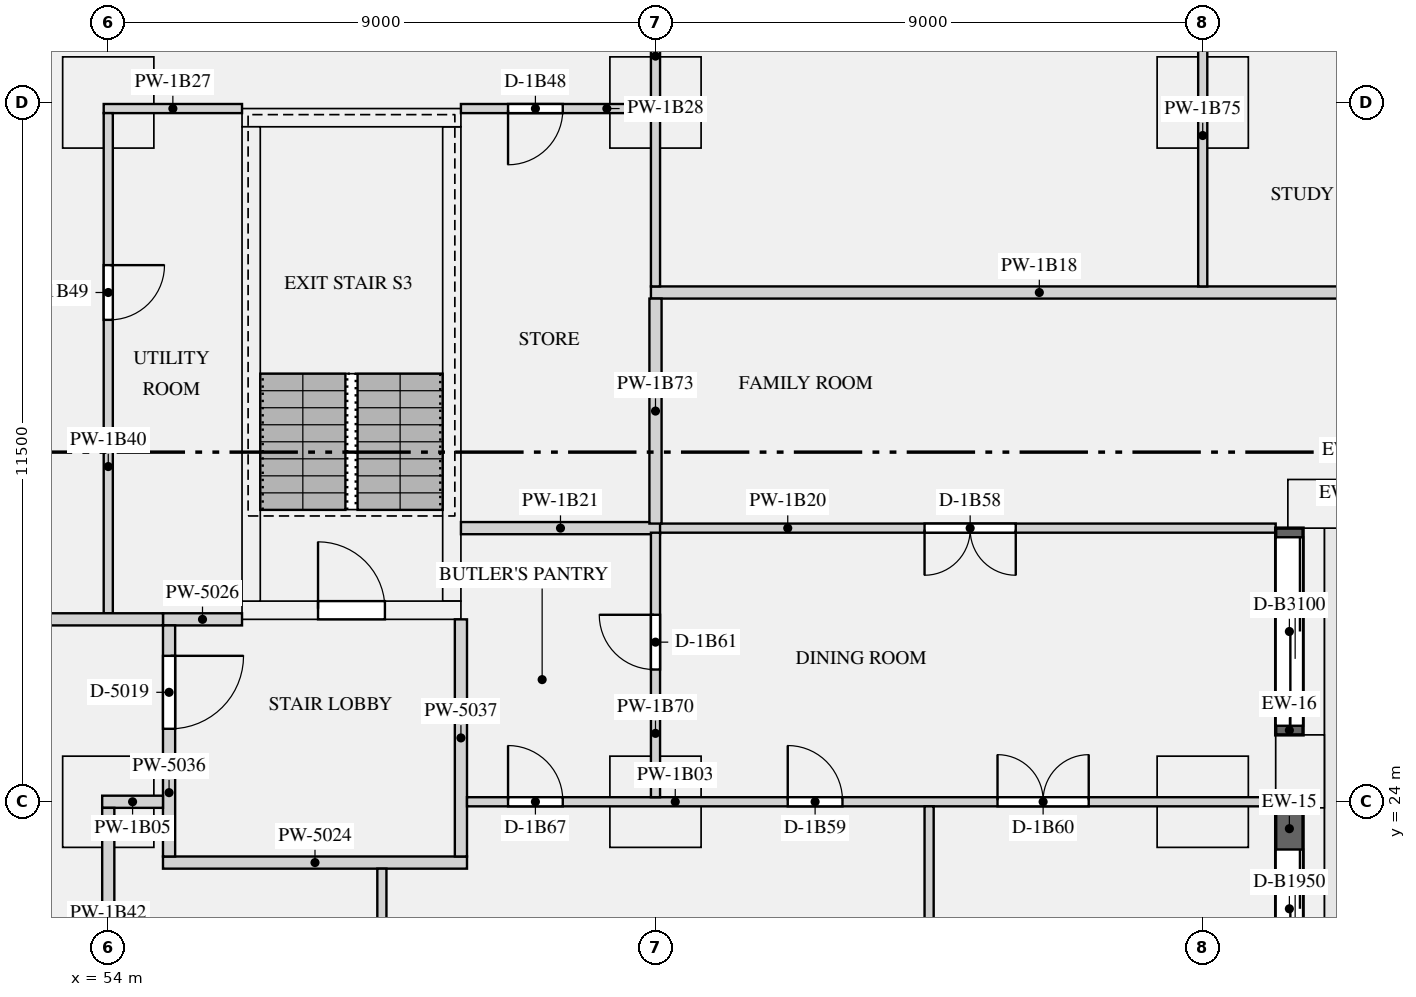
"""IFC4 building model, lengths in metres.
Left out: names, types, materials, properties, quantities, classifications, styles, units other than length and angle.
Written with IfcOpenShell. Run it as: python <this file> out.ifc"""

import sys

from ifc_helpers import new_model, si_unit, direction, frame, frame_2d, origin, origin_2d, place, context, subcontext, project, spatial, rectangle, extrude, element, fill, save


model = new_model("IFC4")
c1 = context("Model", 3, precision=1e-05, world=origin(), true_north=direction((0.0, 1.0)))
c2 = subcontext(c1, "Body", "Model", "MODEL_VIEW")
j1 = project(units=[si_unit("LENGTHUNIT", "METRE"), si_unit("PLANEANGLEUNIT", "RADIAN")], contexts=[c1])
p1 = place(None, origin())
s1 = spatial("IfcSite", under=j1, at=p1, CompositionType="ELEMENT")
p2 = place(p1, origin())
s2 = spatial("IfcBuilding", under=s1, at=p2, CompositionType="ELEMENT")
p3 = place(p2, frame((0.0, 0.0, 28.95)))
s3 = spatial("IfcBuildingStorey", under=s2, at=p3, CompositionType="ELEMENT", Elevation=28.95)
for number, where, z_axis, x_axis in (
    (1, (73.6, 24.5, 0.0), (0.0, 0.0, 1.0), (0.0, 1.0, 0.0)),
    (2, (74.0, 28.9, 0.0), (0.0, 0.0, 1.0), (1.0, 0.0, 0.0)),
):
    element("IfcColumn", number, at=place(p3, frame(where, z_axis=z_axis, x_axis=x_axis)), inside=s3, PredefinedType="USERDEFINED", context=c2, shape_type="SweptSolid", body=[
        extrude(rectangle(XDim=1.2, YDim=0.8, at=origin_2d()), origin(), (0.0, 0.0, 1.0), 3.15),
    ])
for number, where, z_axis, x_axis in (
    (3, (54.0, 24.0, 0.0), (0.0, 0.0, 1.0), (1.0, 0.0, 0.0)),
    (4, (63.0, 24.0, 0.0), (0.0, 0.0, 1.0), (1.0, 0.0, 0.0)),
    (5, (72.0, 24.0, 0.0), (0.0, 0.0, 1.0), (1.0, 0.0, 0.0)),
    (6, (54.0, 35.5, 0.0), (0.0, 0.0, 1.0), (1.0, 0.0, 0.0)),
    (7, (63.0, 35.5, 0.0), (0.0, 0.0, 1.0), (1.0, 0.0, 0.0)),
    (8, (72.0, 35.5, 0.0), (0.0, 0.0, 1.0), (1.0, 0.0, 0.0)),
):
    element("IfcColumn", number, at=place(p3, frame(where, z_axis=z_axis, x_axis=x_axis)), inside=s3, PredefinedType="COLUMN", context=c2, shape_type="SweptSolid", body=[
        extrude(rectangle(XDim=1.5, YDim=1.5, at=origin_2d()), origin(), (0.0, 0.0, 1.0), 3.15),
    ])
p4 = place(p3, frame((56.2, 27.15, 0.0), z_axis=(0.0, 0.0, 1.0), x_axis=(1.0, 0.0, 0.0)))
e9 = element("IfcWall", 9, at=p4, inside=s3, PredefinedType="SHEAR", context=c2, shape_type="SweptSolid", body=[
    extrude(rectangle(XDim=3.6, YDim=0.3, at=frame_2d((1.8, 0.0))), origin(), (0.0, 0.0, 1.0), 3.15),
])
p5 = place(p4, frame((1.25, 0.0, 0.0)))
e10 = element("IfcOpeningElement", 10, at=p5, cuts=e9, PredefinedType="OPENING", context=c2, shape_type="SweptSolid", body=[
    extrude(rectangle(XDim=1.1, YDim=2.1, at=frame_2d((0.55, 1.05))), frame((0.0, 0.16, 0.0), z_axis=(0.0, -1.0, 0.0), x_axis=(1.0, 0.0, 0.0)), (0.0, 0.0, 1.0), 0.32),
])
p6 = place(p3, frame((56.2, 35.25, 0.0), z_axis=(0.0, 0.0, 1.0), x_axis=(1.0, 0.0, 0.0)))
e11 = element("IfcWall", 11, at=p6, inside=s3, PredefinedType="SHEAR", context=c2, shape_type="SweptSolid", body=[
    extrude(rectangle(XDim=3.6, YDim=0.3, at=frame_2d((1.8, 0.0))), origin(), (0.0, 0.0, 1.0), 3.15),
])
for number, where, z_axis, x_axis in (
    (12, (56.35, 27.3, 0.0), (0.0, 0.0, 1.0), (0.0, 1.0, 0.0)),
    (13, (59.65, 27.3, 0.0), (0.0, 0.0, 1.0), (0.0, 1.0, 0.0)),
):
    element("IfcWall", number, at=place(p3, frame(where, z_axis=z_axis, x_axis=x_axis)), inside=s3, PredefinedType="SHEAR", context=c2, shape_type="SweptSolid", body=[
        extrude(rectangle(XDim=7.8, YDim=0.3, at=frame_2d((3.9, 0.0))), origin(), (0.0, 0.0, 1.0), 3.15),
    ])
p7 = place(p3, frame((73.425, 21.1, 0.0), z_axis=(0.0, 0.0, 1.0), x_axis=(0.0, 1.0, 0.0)))
e14 = element("IfcWall", 14, at=p7, inside=s3, PredefinedType="SOLIDWALL", context=c2, shape_type="SweptSolid", body=[
    extrude(rectangle(XDim=2.8, YDim=0.45, at=frame_2d((1.4, 0.0))), origin(), (0.0, 0.0, 1.0), 2.83),
])
p8 = place(p7, frame((0.165, 0.0, 0.0)))
e15 = element("IfcOpeningElement", 15, at=p8, cuts=e14, PredefinedType="OPENING", context=c2, shape_type="SweptSolid", body=[
    extrude(rectangle(XDim=1.95, YDim=2.3, at=frame_2d((0.975, 1.15))), frame((0.0, 0.235, 0.0), z_axis=(0.0, -1.0, 0.0), x_axis=(1.0, 0.0, 0.0)), (0.0, 0.0, 1.0), 0.47),
])
p9 = place(p3, frame((73.425, 25.1, 0.0), z_axis=(0.0, 0.0, 1.0), x_axis=(0.0, 1.0, 0.0)))
e16 = element("IfcWall", 16, at=p9, inside=s3, PredefinedType="SOLIDWALL", context=c2, shape_type="SweptSolid", body=[
    extrude(rectangle(XDim=3.4, YDim=0.45, at=frame_2d((1.7, 0.0))), origin(), (0.0, 0.0, 1.0), 2.83),
])
p10 = place(p9, frame((0.15, 0.0, 0.0)))
e17 = element("IfcOpeningElement", 17, at=p10, cuts=e16, PredefinedType="OPENING", context=c2, shape_type="SweptSolid", body=[
    extrude(rectangle(XDim=3.1, YDim=2.3, at=frame_2d((1.55, 1.15))), frame((0.0, 0.235, 0.0), z_axis=(0.0, -1.0, 0.0), x_axis=(1.0, 0.0, 0.0)), (0.0, 0.0, 1.0), 0.47),
])
p11 = place(p3, frame((54.9, 23.0, 0.0), z_axis=(0.0, 0.0, 1.0), x_axis=(1.0, 0.0, 0.0)))
e18 = element("IfcWall", 18, at=p11, inside=s3, PredefinedType="PARTITIONING", context=c2, shape_type="SweptSolid", body=[
    extrude(rectangle(XDim=5.0, YDim=0.2, at=frame_2d((2.5, 0.0))), origin(), (0.0, 0.0, 1.0), 2.83),
])
p12 = place(p3, frame((54.9, 27.0, 0.0), z_axis=(0.0, 0.0, 1.0), x_axis=(1.0, 0.0, 0.0)))
e19 = element("IfcWall", 19, at=p12, inside=s3, PredefinedType="PARTITIONING", context=c2, shape_type="SweptSolid", body=[
    extrude(rectangle(XDim=1.3, YDim=0.2, at=frame_2d((0.65, 0.0))), origin(), (0.0, 0.0, 1.0), 2.83),
])
p13 = place(p3, frame((55.0, 23.1, 0.0), z_axis=(0.0, 0.0, 1.0), x_axis=(0.0, 1.0, 0.0)))
e20 = element("IfcWall", 20, at=p13, inside=s3, PredefinedType="PARTITIONING", context=c2, shape_type="SweptSolid", body=[
    extrude(rectangle(XDim=3.8, YDim=0.2, at=frame_2d((1.9, 0.0))), origin(), (0.0, 0.0, 1.0), 2.83),
])
p14 = place(p13, frame((2.1, 0.0, 0.0)))
e21 = element("IfcOpeningElement", 21, at=p14, cuts=e20, PredefinedType="OPENING", context=c2, shape_type="SweptSolid", body=[
    extrude(rectangle(XDim=1.2, YDim=2.1, at=frame_2d((0.6, 1.05))), frame((0.0, 0.11, 0.0), z_axis=(0.0, -1.0, 0.0), x_axis=(1.0, 0.0, 0.0)), (0.0, 0.0, 1.0), 0.22),
])
p15 = place(p3, frame((59.8, 23.1, 0.0), z_axis=(0.0, 0.0, 1.0), x_axis=(0.0, 1.0, 0.0)))
e22 = element("IfcWall", 22, at=p15, inside=s3, PredefinedType="PARTITIONING", context=c2, shape_type="SweptSolid", body=[
    extrude(rectangle(XDim=3.9, YDim=0.2, at=frame_2d((1.95, 0.0))), origin(), (0.0, 0.0, 1.0), 2.83),
])
p16 = place(p3, frame((59.9, 24.0, 0.0), z_axis=(0.0, 0.0, 1.0), x_axis=(1.0, 0.0, 0.0)))
e23 = element("IfcWall", 23, at=p16, inside=s3, PredefinedType="PARTITIONING", context=c2, shape_type="SweptSolid", body=[
    extrude(rectangle(XDim=13.3, YDim=0.15, at=frame_2d((6.65, 0.0))), origin(), (0.0, 0.0, 1.0), 2.83),
])
p17 = place(p16, frame((5.275, 0.0, 0.0)))
e24 = element("IfcOpeningElement", 24, at=p17, cuts=e23, PredefinedType="OPENING", context=c2, shape_type="SweptSolid", body=[
    extrude(rectangle(XDim=0.9, YDim=2.1, at=frame_2d((0.45, 1.05))), frame((0.0, 0.085, 0.0), z_axis=(0.0, -1.0, 0.0), x_axis=(1.0, 0.0, 0.0)), (0.0, 0.0, 1.0), 0.17),
])
p18 = place(p16, frame((8.725, 0.0, 0.0)))
e25 = element("IfcOpeningElement", 25, at=p18, cuts=e23, PredefinedType="OPENING", context=c2, shape_type="SweptSolid", body=[
    extrude(rectangle(XDim=1.5, YDim=2.1, at=frame_2d((0.75, 1.05))), frame((0.0, 0.085, 0.0), z_axis=(0.0, -1.0, 0.0), x_axis=(1.0, 0.0, 0.0)), (0.0, 0.0, 1.0), 0.17),
])
p19 = place(p16, frame((0.675, 0.0, 0.0)))
e26 = element("IfcOpeningElement", 26, at=p19, cuts=e23, PredefinedType="OPENING", context=c2, shape_type="SweptSolid", body=[
    extrude(rectangle(XDim=0.9, YDim=2.1, at=frame_2d((0.45, 1.05))), frame((0.0, 0.085, 0.0), z_axis=(0.0, -1.0, 0.0), x_axis=(1.0, 0.0, 0.0)), (0.0, 0.0, 1.0), 0.17),
])
p20 = place(p3, frame((53.9, 24.0, 0.0), z_axis=(0.0, 0.0, 1.0), x_axis=(1.0, 0.0, 0.0)))
e27 = element("IfcWall", 27, at=p20, inside=s3, PredefinedType="PARTITIONING", context=c2, shape_type="SweptSolid", body=[
    extrude(rectangle(XDim=1.0, YDim=0.2, at=frame_2d((0.5, 0.0))), origin(), (0.0, 0.0, 1.0), 2.83),
])
p21 = place(p3, frame((47.9, 27.0, 0.0), z_axis=(0.0, 0.0, 1.0), x_axis=(1.0, 0.0, 0.0)))
e28 = element("IfcWall", 28, at=p21, inside=s3, PredefinedType="PARTITIONING", context=c2, shape_type="SweptSolid", body=[
    extrude(rectangle(XDim=7.0, YDim=0.2, at=frame_2d((3.5, 0.0))), origin(), (0.0, 0.0, 1.0), 2.83),
])
p22 = place(p3, frame((62.925, 32.375, 0.0), z_axis=(0.0, 0.0, 1.0), x_axis=(1.0, 0.0, 0.0)))
e29 = element("IfcWall", 29, at=p22, inside=s3, PredefinedType="PARTITIONING", context=c2, shape_type="SweptSolid", body=[
    extrude(rectangle(XDim=12.775, YDim=0.2, at=frame_2d((6.387, 0.0))), origin(), (0.0, 0.0, 1.0), 2.83),
])
p23 = place(p3, frame((62.925, 28.5, 0.0), z_axis=(0.0, 0.0, 1.0), x_axis=(1.0, 0.0, 0.0)))
e30 = element("IfcWall", 30, at=p23, inside=s3, PredefinedType="PARTITIONING", context=c2, shape_type="SweptSolid", body=[
    extrude(rectangle(XDim=10.275, YDim=0.15, at=frame_2d((5.137, 0.0))), origin(), (0.0, 0.0, 1.0), 2.83),
])
p24 = place(p23, frame((4.5, 0.0, 0.0)))
e31 = element("IfcOpeningElement", 31, at=p24, cuts=e30, PredefinedType="OPENING", context=c2, shape_type="SweptSolid", body=[
    extrude(rectangle(XDim=1.5, YDim=2.1, at=frame_2d((0.75, 1.05))), frame((0.0, 0.085, 0.0), z_axis=(0.0, -1.0, 0.0), x_axis=(1.0, 0.0, 0.0)), (0.0, 0.0, 1.0), 0.17),
])
p25 = place(p3, frame((59.8, 28.5, 0.0), z_axis=(0.0, 0.0, 1.0), x_axis=(1.0, 0.0, 0.0)))
e32 = element("IfcWall", 32, at=p25, inside=s3, PredefinedType="PARTITIONING", context=c2, shape_type="SweptSolid", body=[
    extrude(rectangle(XDim=3.275, YDim=0.2, at=frame_2d((1.637, 0.0))), origin(), (0.0, 0.0, 1.0), 2.83),
])
p26 = place(p3, frame((53.925, 35.4, 0.0), z_axis=(0.0, 0.0, 1.0), x_axis=(1.0, 0.0, 0.0)))
e33 = element("IfcWall", 33, at=p26, inside=s3, PredefinedType="PARTITIONING", context=c2, shape_type="SweptSolid", body=[
    extrude(rectangle(XDim=2.275, YDim=0.15, at=frame_2d((1.137, 0.0))), origin(), (0.0, 0.0, 1.0), 2.83),
])
p27 = place(p3, frame((59.8, 35.4, 0.0), z_axis=(0.0, 0.0, 1.0), x_axis=(1.0, 0.0, 0.0)))
e34 = element("IfcWall", 34, at=p27, inside=s3, PredefinedType="PARTITIONING", context=c2, shape_type="SweptSolid", body=[
    extrude(rectangle(XDim=3.125, YDim=0.15, at=frame_2d((1.562, 0.0))), origin(), (0.0, 0.0, 1.0), 2.83),
])
p28 = place(p27, frame((0.775, 0.0, 0.0)))
e35 = element("IfcOpeningElement", 35, at=p28, cuts=e34, PredefinedType="OPENING", context=c2, shape_type="SweptSolid", body=[
    extrude(rectangle(XDim=0.9, YDim=2.1, at=frame_2d((0.45, 1.05))), frame((0.0, 0.085, 0.0), z_axis=(0.0, -1.0, 0.0), x_axis=(1.0, 0.0, 0.0)), (0.0, 0.0, 1.0), 0.17),
])
p29 = place(p3, frame((54.0, 27.1, 0.0), z_axis=(0.0, 0.0, 1.0), x_axis=(0.0, 1.0, 0.0)))
e36 = element("IfcWall", 36, at=p29, inside=s3, PredefinedType="PARTITIONING", context=c2, shape_type="SweptSolid", body=[
    extrude(rectangle(XDim=8.225, YDim=0.15, at=frame_2d((4.112, 0.0))), origin(), (0.0, 0.0, 1.0), 2.83),
])
p30 = place(p29, frame((4.825, 0.0, 0.0)))
e37 = element("IfcOpeningElement", 37, at=p30, cuts=e36, PredefinedType="OPENING", context=c2, shape_type="SweptSolid", body=[
    extrude(rectangle(XDim=0.9, YDim=2.1, at=frame_2d((0.45, 1.05))), frame((0.0, 0.085, 0.0), z_axis=(0.0, -1.0, 0.0), x_axis=(1.0, 0.0, 0.0)), (0.0, 0.0, 1.0), 0.17),
])
p31 = place(p3, frame((54.0, 16.1, 0.0), z_axis=(0.0, 0.0, 1.0), x_axis=(0.0, 1.0, 0.0)))
e38 = element("IfcWall", 38, at=p31, inside=s3, PredefinedType="PARTITIONING", context=c2, shape_type="SweptSolid", body=[
    extrude(rectangle(XDim=7.8, YDim=0.2, at=frame_2d((3.9, 0.0))), origin(), (0.0, 0.0, 1.0), 2.83),
])
p32 = place(p31, frame((2.35, 0.0, 0.0)))
e39 = element("IfcOpeningElement", 39, at=p32, cuts=e38, PredefinedType="OPENING", context=c2, shape_type="SweptSolid", body=[
    extrude(rectangle(XDim=1.1, YDim=2.1, at=frame_2d((0.55, 1.05))), frame((0.0, 0.11, 0.0), z_axis=(0.0, -1.0, 0.0), x_axis=(1.0, 0.0, 0.0)), (0.0, 0.0, 1.0), 0.22),
])
p33 = place(p3, frame((63.0, 24.075, 0.0), z_axis=(0.0, 0.0, 1.0), x_axis=(0.0, 1.0, 0.0)))
e40 = element("IfcWall", 40, at=p33, inside=s3, PredefinedType="PARTITIONING", context=c2, shape_type="SweptSolid", body=[
    extrude(rectangle(XDim=4.35, YDim=0.15, at=frame_2d((2.175, 0.0))), origin(), (0.0, 0.0, 1.0), 2.83),
])
p34 = place(p33, frame((2.1, 0.0, 0.0)))
e41 = element("IfcOpeningElement", 41, at=p34, cuts=e40, PredefinedType="OPENING", context=c2, shape_type="SweptSolid", body=[
    extrude(rectangle(XDim=0.9, YDim=2.1, at=frame_2d((0.45, 1.05))), frame((0.0, 0.085, 0.0), z_axis=(0.0, -1.0, 0.0), x_axis=(1.0, 0.0, 0.0)), (0.0, 0.0, 1.0), 0.17),
])
p35 = place(p3, frame((63.0, 32.475, 0.0), z_axis=(0.0, 0.0, 1.0), x_axis=(0.0, 1.0, 0.0)))
e42 = element("IfcWall", 42, at=p35, inside=s3, PredefinedType="PARTITIONING", context=c2, shape_type="SweptSolid", body=[
    extrude(rectangle(XDim=7.575, YDim=0.15, at=frame_2d((3.788, 0.0))), origin(), (0.0, 0.0, 1.0), 2.83),
])
p36 = place(p3, frame((63.0, 28.575, 0.0), z_axis=(0.0, 0.0, 1.0), x_axis=(0.0, 1.0, 0.0)))
e43 = element("IfcWall", 43, at=p36, inside=s3, PredefinedType="PARTITIONING", context=c2, shape_type="SweptSolid", body=[
    extrude(rectangle(XDim=3.7, YDim=0.2, at=frame_2d((1.85, 0.0))), origin(), (0.0, 0.0, 1.0), 2.83),
])
p37 = place(p3, frame((72.0, 32.475, 0.0), z_axis=(0.0, 0.0, 1.0), x_axis=(0.0, 1.0, 0.0)))
e44 = element("IfcWall", 44, at=p37, inside=s3, PredefinedType="PARTITIONING", context=c2, shape_type="SweptSolid", body=[
    extrude(rectangle(XDim=7.575, YDim=0.15, at=frame_2d((3.788, 0.0))), origin(), (0.0, 0.0, 1.0), 2.83),
])
p38 = place(p37, frame((4.963, 0.0, 0.0)))
e45 = element("IfcOpeningElement", 45, at=p38, cuts=e44, PredefinedType="OPENING", context=c2, shape_type="SweptSolid", body=[
    extrude(rectangle(XDim=1.5, YDim=2.1, at=frame_2d((0.75, 1.05))), frame((0.0, 0.085, 0.0), z_axis=(0.0, -1.0, 0.0), x_axis=(1.0, 0.0, 0.0)), (0.0, 0.0, 1.0), 0.17),
])
p39 = place(p3, frame((67.5, 12.575, 0.0), z_axis=(0.0, 0.0, 1.0), x_axis=(0.0, 1.0, 0.0)))
e46 = element("IfcWall", 46, at=p39, inside=s3, PredefinedType="PARTITIONING", context=c2, shape_type="SweptSolid", body=[
    extrude(rectangle(XDim=11.35, YDim=0.15, at=frame_2d((5.675, 0.0))), origin(), (0.0, 0.0, 1.0), 2.83),
])
p40 = place(p39, frame((7.225, 0.0, 0.0)))
e47 = element("IfcOpeningElement", 47, at=p40, cuts=e46, PredefinedType="OPENING", context=c2, shape_type="SweptSolid", body=[
    extrude(rectangle(XDim=0.9, YDim=2.1, at=frame_2d((0.45, 1.05))), frame((0.0, 0.085, 0.0), z_axis=(0.0, -1.0, 0.0), x_axis=(1.0, 0.0, 0.0)), (0.0, 0.0, 1.0), 0.17),
])
p41 = place(p3, frame((58.5, 12.575, 0.0), z_axis=(0.0, 0.0, 1.0), x_axis=(0.0, 1.0, 0.0)))
e48 = element("IfcWall", 48, at=p41, inside=s3, PredefinedType="PARTITIONING", context=c2, shape_type="SweptSolid", body=[
    extrude(rectangle(XDim=10.325, YDim=0.15, at=frame_2d((5.163, 0.0))), origin(), (0.0, 0.0, 1.0), 2.83),
])
p42 = place(p41, frame((1.475, 0.0, 0.0)))
e49 = element("IfcOpeningElement", 49, at=p42, cuts=e48, PredefinedType="OPENING", context=c2, shape_type="SweptSolid", body=[
    extrude(rectangle(XDim=0.9, YDim=2.1, at=frame_2d((0.45, 1.05))), frame((0.0, 0.085, 0.0), z_axis=(0.0, -1.0, 0.0), x_axis=(1.0, 0.0, 0.0)), (0.0, 0.0, 1.0), 0.17),
])
p43 = place(p41, frame((6.75, 0.0, 0.0)))
e50 = element("IfcOpeningElement", 50, at=p43, cuts=e48, PredefinedType="OPENING", context=c2, shape_type="SweptSolid", body=[
    extrude(rectangle(XDim=0.9, YDim=2.1, at=frame_2d((0.45, 1.05))), frame((0.0, 0.085, 0.0), z_axis=(0.0, -1.0, 0.0), x_axis=(1.0, 0.0, 0.0)), (0.0, 0.0, 1.0), 0.17),
])
p44 = place(p8, origin())
e51 = element("IfcDoor", 51, at=p44, inside=s3, OperationType="SLIDING_TO_LEFT", PredefinedType="DOOR", context=c2, shape_type="SweptSolid", body=[
    extrude(rectangle(XDim=1.95, YDim=2.3, at=frame_2d((0.975, 1.15))), frame((0.0, -0.07, 0.0), z_axis=(0.0, -1.0, 0.0), x_axis=(1.0, 0.0, 0.0)), (0.0, 0.0, 1.0), 0.05),
])
fill(e15, e51)
p45 = place(p10, origin())
e52 = element("IfcDoor", 52, at=p45, inside=s3, OperationType="SLIDING_TO_LEFT", PredefinedType="DOOR", context=c2, shape_type="SweptSolid", body=[
    extrude(rectangle(XDim=3.1, YDim=2.3, at=frame_2d((1.55, 1.15))), frame((0.0, -0.07, 0.0), z_axis=(0.0, -1.0, 0.0), x_axis=(1.0, 0.0, 0.0)), (0.0, 0.0, 1.0), 0.05),
])
fill(e17, e52)
p46 = place(p5, origin())
e53 = element("IfcDoor", 53, at=p46, inside=s3, OperationType="SINGLE_SWING_LEFT", PredefinedType="DOOR", context=c2, shape_type="SweptSolid", body=[
    extrude(rectangle(XDim=1.1, YDim=2.1, at=frame_2d((0.55, 1.05))), frame((0.0, 0.025, 0.0), z_axis=(0.0, -1.0, 0.0), x_axis=(1.0, 0.0, 0.0)), (0.0, 0.0, 1.0), 0.05),
])
fill(e10, e53)
p47 = place(p14, frame((1.2, 0.0, 0.0), z_axis=(0.0, 0.0, 1.0), x_axis=(-1.0, 0.0, 0.0)))
e54 = element("IfcDoor", 54, at=p47, inside=s3, OperationType="SINGLE_SWING_LEFT", PredefinedType="DOOR", context=c2, shape_type="SweptSolid", body=[
    extrude(rectangle(XDim=1.2, YDim=2.1, at=frame_2d((0.6, 1.05))), frame((0.0, 0.025, 0.0), z_axis=(0.0, -1.0, 0.0), x_axis=(1.0, 0.0, 0.0)), (0.0, 0.0, 1.0), 0.05),
])
fill(e21, e54)
p48 = place(p28, frame((0.9, 0.0, 0.0), z_axis=(0.0, 0.0, 1.0), x_axis=(-1.0, 0.0, 0.0)))
e55 = element("IfcDoor", 55, at=p48, inside=s3, OperationType="SINGLE_SWING_RIGHT", PredefinedType="DOOR", context=c2, shape_type="SweptSolid", body=[
    extrude(rectangle(XDim=0.9, YDim=2.1, at=frame_2d((0.45, 1.05))), frame((0.0, 0.025, 0.0), z_axis=(0.0, -1.0, 0.0), x_axis=(1.0, 0.0, 0.0)), (0.0, 0.0, 1.0), 0.05),
])
fill(e35, e55)
p49 = place(p30, frame((0.9, 0.0, 0.0), z_axis=(0.0, 0.0, 1.0), x_axis=(-1.0, 0.0, 0.0)))
e56 = element("IfcDoor", 56, at=p49, inside=s3, OperationType="SINGLE_SWING_LEFT", PredefinedType="DOOR", context=c2, shape_type="SweptSolid", body=[
    extrude(rectangle(XDim=0.9, YDim=2.1, at=frame_2d((0.45, 1.05))), frame((0.0, 0.025, 0.0), z_axis=(0.0, -1.0, 0.0), x_axis=(1.0, 0.0, 0.0)), (0.0, 0.0, 1.0), 0.05),
])
fill(e37, e56)
p50 = place(p24, frame((1.5, 0.0, 0.0), z_axis=(0.0, 0.0, 1.0), x_axis=(-1.0, 0.0, 0.0)))
e57 = element("IfcDoor", 57, at=p50, inside=s3, OperationType="DOUBLE_DOOR_SINGLE_SWING", PredefinedType="DOOR", context=c2, shape_type="SweptSolid", body=[
    extrude(rectangle(XDim=1.5, YDim=2.1, at=frame_2d((0.75, 1.05))), frame((0.0, 0.025, 0.0), z_axis=(0.0, -1.0, 0.0), x_axis=(1.0, 0.0, 0.0)), (0.0, 0.0, 1.0), 0.05),
])
fill(e31, e57)
p51 = place(p17, origin())
e58 = element("IfcDoor", 58, at=p51, inside=s3, OperationType="SINGLE_SWING_LEFT", PredefinedType="DOOR", context=c2, shape_type="SweptSolid", body=[
    extrude(rectangle(XDim=0.9, YDim=2.1, at=frame_2d((0.45, 1.05))), frame((0.0, 0.025, 0.0), z_axis=(0.0, -1.0, 0.0), x_axis=(1.0, 0.0, 0.0)), (0.0, 0.0, 1.0), 0.05),
])
fill(e24, e58)
p52 = place(p18, origin())
e59 = element("IfcDoor", 59, at=p52, inside=s3, OperationType="DOUBLE_DOOR_SINGLE_SWING", PredefinedType="DOOR", context=c2, shape_type="SweptSolid", body=[
    extrude(rectangle(XDim=1.5, YDim=2.1, at=frame_2d((0.75, 1.05))), frame((0.0, 0.025, 0.0), z_axis=(0.0, -1.0, 0.0), x_axis=(1.0, 0.0, 0.0)), (0.0, 0.0, 1.0), 0.05),
])
fill(e25, e59)
p53 = place(p34, origin())
e60 = element("IfcDoor", 60, at=p53, inside=s3, OperationType="SINGLE_SWING_RIGHT", PredefinedType="DOOR", context=c2, shape_type="SweptSolid", body=[
    extrude(rectangle(XDim=0.9, YDim=2.1, at=frame_2d((0.45, 1.05))), frame((0.0, 0.025, 0.0), z_axis=(0.0, -1.0, 0.0), x_axis=(1.0, 0.0, 0.0)), (0.0, 0.0, 1.0), 0.05),
])
fill(e41, e60)
p54 = place(p19, origin())
e61 = element("IfcDoor", 61, at=p54, inside=s3, OperationType="SINGLE_SWING_LEFT", PredefinedType="DOOR", context=c2, shape_type="SweptSolid", body=[
    extrude(rectangle(XDim=0.9, YDim=2.1, at=frame_2d((0.45, 1.05))), frame((0.0, 0.025, 0.0), z_axis=(0.0, -1.0, 0.0), x_axis=(1.0, 0.0, 0.0)), (0.0, 0.0, 1.0), 0.05),
])
fill(e26, e61)
save(model, sys.argv[1])
